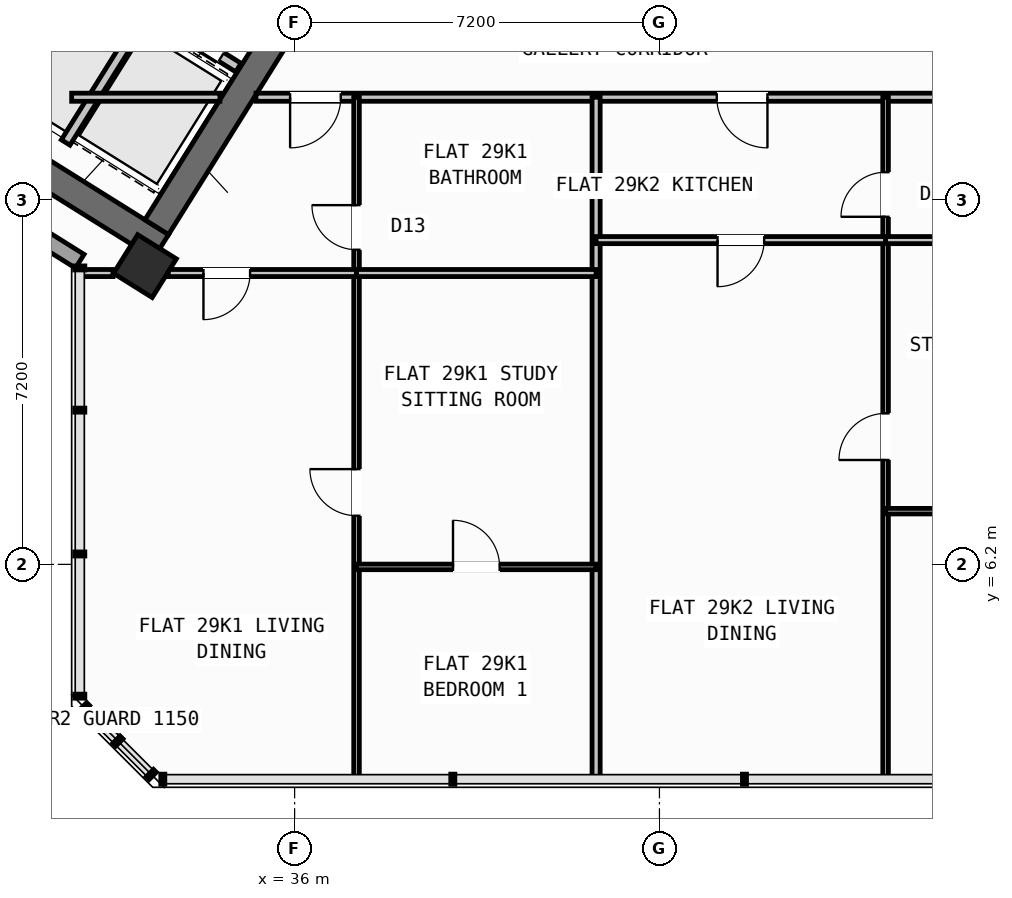
"""IFC4 building model, lengths in metres.
Left out: names, types, materials, properties, quantities, classifications, styles, units other than length and angle.
Written with IfcOpenShell. Run it as: python <this file> out.ifc"""

import sys

from ifc_helpers import new_model, si_unit, direction, frame, frame_2d, origin, origin_2d, place, context, subcontext, project, spatial, rectangle, hollow_rectangle, extrude, source, transform, mapped, element, fill, save


model = new_model("IFC4")
c1 = context("Model", 3, precision=1e-05, world=origin(), true_north=direction((0.0, 1.0)))
c2 = subcontext(c1, "Body", "Model", "MODEL_VIEW")
j1 = project(units=[si_unit("LENGTHUNIT", "METRE"), si_unit("PLANEANGLEUNIT", "RADIAN")], contexts=[c1])
p1 = place(None, origin())
s1 = spatial("IfcSite", under=j1, at=p1, CompositionType="ELEMENT")
p2 = place(p1, origin())
s2 = spatial("IfcBuilding", under=s1, at=p2, CompositionType="ELEMENT")
p3 = place(p2, frame((0.0, 0.0, 116.1)))
s3 = spatial("IfcBuildingStorey", under=s2, at=p3, CompositionType="ELEMENT", Elevation=116.1)
p4 = place(p3, frame((33.366, 12.477, 0.0), z_axis=(0.0, 0.0, 1.0), x_axis=(-0.848047359947, 0.529920442413, 0.0)))
e1 = element("IfcWall", 1, at=p4, inside=s3, PredefinedType="SHEAR", context=c2, shape_type="SweptSolid", body=[
    extrude(rectangle(XDim=13.14, YDim=0.55, at=frame_2d((6.57, 0.0))), origin(), (0.0, 0.0, 1.0), 3.35),
])
p5 = place(p3, frame((36.683, 18.304, 0.0), z_axis=(0.0, 0.0, 1.0), x_axis=(-0.529896466841, -0.848062341122, 0.0)))
e2 = element("IfcWall", 2, at=p5, inside=s3, PredefinedType="SHEAR", context=c2, shape_type="SweptSolid", body=[
    extrude(rectangle(XDim=6.425, YDim=0.55, at=frame_2d((3.212, 0.0))), origin(), (0.0, 0.0, 1.0), 3.35),
])
m1 = source(origin(), c2, "Body", "SweptSolid", [
    extrude(hollow_rectangle(XDim=0.9, YDim=0.9, WallThickness=0.036, at=origin_2d()), origin(), (0.0, 0.0, 1.0), 3.6),
])
p6 = place(p3, frame((33.046, 12.087, 0.0), z_axis=(0.0, 0.0, 1.0), x_axis=(-0.848048096156, 0.529919264233, 0.0)))
e3 = element("IfcColumn", 3, at=p6, inside=s3, PredefinedType="COLUMN", context=c2, shape_type="MappedRepresentation", body=[
    mapped(m1, transform((0.0, 0.0, 0.0), scale=1.0)),
])
p7 = place(p3, frame((31.76, 12.183, 0.0), z_axis=(0.0, 0.0, 1.0), x_axis=(-0.848047074256, 0.529920899612, 0.0)))
e4 = element("IfcWall", 4, at=p7, inside=s3, PredefinedType="STANDARD", context=c2, shape_type="SweptSolid", body=[
    extrude(rectangle(XDim=30.652, YDim=0.32, at=frame_2d((15.326, 0.0))), origin(), (0.0, 0.0, 1.0), 3.35),
])
p8 = place(p7, frame((15.153, 0.0, 0.0)))
e5 = element("IfcOpeningElement", 5, at=p8, cuts=e4, PredefinedType="OPENING", context=c2, shape_type="SweptSolid", body=[
    extrude(rectangle(XDim=1.2, YDim=2.15, at=frame_2d((0.6, 1.075))), frame((0.0, 0.17, 0.0), z_axis=(0.0, -1.0, 0.0), x_axis=(1.0, 0.0, 0.0)), (0.0, 0.0, 1.0), 0.34),
])
p9 = place(p7, frame((2.002, 0.0, 0.8)))
e6 = element("IfcOpeningElement", 6, at=p9, cuts=e4, PredefinedType="OPENING", context=c2, shape_type="SweptSolid", body=[
    extrude(rectangle(XDim=2.1, YDim=1.55, at=frame_2d((1.05, 0.775))), frame((0.0, 0.17, 0.0), z_axis=(0.0, -1.0, 0.0), x_axis=(1.0, 0.0, 0.0)), (0.0, 0.0, 1.0), 0.34),
])
p10 = place(p7, frame((7.206, 0.0, 0.8)))
e7 = element("IfcOpeningElement", 7, at=p10, cuts=e4, PredefinedType="OPENING", context=c2, shape_type="SweptSolid", body=[
    extrude(rectangle(XDim=2.1, YDim=1.55, at=frame_2d((1.05, 0.775))), frame((0.0, 0.17, 0.0), z_axis=(0.0, -1.0, 0.0), x_axis=(1.0, 0.0, 0.0)), (0.0, 0.0, 1.0), 0.34),
])
p11 = place(p7, frame((12.648, 0.0, 1.0)))
e8 = element("IfcOpeningElement", 8, at=p11, cuts=e4, PredefinedType="OPENING", context=c2, shape_type="SweptSolid", body=[
    extrude(rectangle(XDim=0.9, YDim=1.25, at=frame_2d((0.45, 0.625))), frame((0.0, 0.17, 0.0), z_axis=(0.0, -1.0, 0.0), x_axis=(1.0, 0.0, 0.0)), (0.0, 0.0, 1.0), 0.34),
])
p12 = place(p7, frame((19.458, 0.0, 0.95)))
e9 = element("IfcOpeningElement", 9, at=p12, cuts=e4, PredefinedType="OPENING", context=c2, shape_type="SweptSolid", body=[
    extrude(rectangle(XDim=1.2, YDim=1.4, at=frame_2d((0.6, 0.7))), frame((0.0, 0.17, 0.0), z_axis=(0.0, -1.0, 0.0), x_axis=(1.0, 0.0, 0.0)), (0.0, 0.0, 1.0), 0.34),
])
p13 = place(p7, frame((21.858, 0.0, 0.95)))
e10 = element("IfcOpeningElement", 10, at=p13, cuts=e4, PredefinedType="OPENING", context=c2, shape_type="SweptSolid", body=[
    extrude(rectangle(XDim=1.2, YDim=1.4, at=frame_2d((0.6, 0.7))), frame((0.0, 0.17, 0.0), z_axis=(0.0, -1.0, 0.0), x_axis=(1.0, 0.0, 0.0)), (0.0, 0.0, 1.0), 0.34),
])
p14 = place(p7, frame((27.266, 0.0, 0.8)))
e11 = element("IfcOpeningElement", 11, at=p14, cuts=e4, PredefinedType="OPENING", context=c2, shape_type="SweptSolid", body=[
    extrude(rectangle(XDim=2.1, YDim=1.55, at=frame_2d((1.05, 0.775))), frame((0.0, 0.17, 0.0), z_axis=(0.0, -1.0, 0.0), x_axis=(1.0, 0.0, 0.0)), (0.0, 0.0, 1.0), 0.34),
])
p15 = place(p3, frame((31.288, 18.256, 0.0), z_axis=(0.0, 0.0, 1.0), x_axis=(-0.529943379326, -0.848033026897, 0.0)))
e12 = element("IfcWall", 12, at=p15, inside=s3, PredefinedType="SHEAR", context=c2, shape_type="SweptSolid", body=[
    extrude(rectangle(XDim=3.16, YDim=0.26, at=frame_2d((1.58, 0.0))), origin(), (0.0, 0.0, 1.0), 3.35),
])
p16 = place(p3, frame((34.891, 16.005, 0.0), z_axis=(0.0, 0.0, 1.0), x_axis=(-0.848062873452, 0.529895614884, 0.0)))
e13 = element("IfcWall", 13, at=p16, inside=s3, PredefinedType="STANDARD", context=c2, shape_type="SweptSolid", body=[
    extrude(rectangle(XDim=4.248, YDim=0.2, at=frame_2d((2.124, 0.0))), origin(), (0.0, 0.0, 1.0), 3.34),
])
p17 = place(p16, frame((0.398, 0.0, 0.0)))
e14 = element("IfcOpeningElement", 14, at=p17, cuts=e13, PredefinedType="OPENING", context=c2, shape_type="SweptSolid", body=[
    extrude(rectangle(XDim=1.3, YDim=2.2, at=frame_2d((0.65, 1.1))), frame((0.0, 0.11, 0.0), z_axis=(0.0, -1.0, 0.0), x_axis=(1.0, 0.0, 0.0)), (0.0, 0.0, 1.0), 0.22),
])
p18 = place(p16, frame((2.473, 0.0, 0.0)))
e15 = element("IfcOpeningElement", 15, at=p18, cuts=e13, PredefinedType="OPENING", context=c2, shape_type="SweptSolid", body=[
    extrude(rectangle(XDim=1.45, YDim=2.25, at=frame_2d((0.725, 1.125))), frame((0.0, 0.11, 0.0), z_axis=(0.0, -1.0, 0.0), x_axis=(1.0, 0.0, 0.0)), (0.0, 0.0, 1.0), 0.22),
])
p19 = place(p3, frame((33.029, 17.003, 0.0), z_axis=(0.0, 0.0, 1.0), x_axis=(-0.529916267533, -0.848049968695, 0.0)))
e16 = element("IfcWall", 16, at=p19, inside=s3, PredefinedType="STANDARD", context=c2, shape_type="SweptSolid", body=[
    extrude(rectangle(XDim=2.92, YDim=0.2, at=frame_2d((1.46, 0.0))), origin(), (0.0, 0.0, 1.0), 3.34),
])
p20 = place(p3, frame((31.6, 15.42, 0.0), z_axis=(0.0, 0.0, 1.0), x_axis=(1.0, 0.0, 0.0)))
e17 = element("IfcWall", 17, at=p20, inside=s3, PredefinedType="PARTITIONING", context=c2, shape_type="SweptSolid", body=[
    extrude(rectangle(XDim=2.925, YDim=0.16, at=frame_2d((1.462, 0.0))), origin(), (0.0, 0.0, 1.0), 3.34),
])
p21 = place(p3, frame((35.237, 15.42, 0.0), z_axis=(0.0, 0.0, 1.0), x_axis=(1.0, 0.0, 0.0)))
e18 = element("IfcWall", 18, at=p21, inside=s3, PredefinedType="PARTITIONING", context=c2, shape_type="SweptSolid", body=[
    extrude(rectangle(XDim=15.432, YDim=0.16, at=frame_2d((7.716, 0.0))), origin(), (0.0, 0.0, 1.0), 3.34),
])
p22 = place(p21, frame((0.674, 0.0, 0.0)))
e19 = element("IfcOpeningElement", 19, at=p22, cuts=e18, PredefinedType="OPENING", context=c2, shape_type="SweptSolid", body=[
    extrude(rectangle(XDim=1.0, YDim=2.1, at=frame_2d((0.5, 1.05))), frame((0.0, 0.09, 0.0), z_axis=(0.0, -1.0, 0.0), x_axis=(1.0, 0.0, 0.0)), (0.0, 0.0, 1.0), 0.18),
])
p23 = place(p21, frame((9.094, 0.0, 0.0)))
e20 = element("IfcOpeningElement", 20, at=p23, cuts=e18, PredefinedType="OPENING", context=c2, shape_type="SweptSolid", body=[
    extrude(rectangle(XDim=1.0, YDim=2.1, at=frame_2d((0.5, 1.05))), frame((0.0, 0.09, 0.0), z_axis=(0.0, -1.0, 0.0), x_axis=(1.0, 0.0, 0.0)), (0.0, 0.0, 1.0), 0.18),
])
p24 = place(p3, frame((50.119, 16.333, 0.0), z_axis=(0.0, 0.0, 1.0), x_axis=(-0.587749856981, 0.809042709391, 0.0)))
e21 = element("IfcWall", 21, at=p24, inside=s3, PredefinedType="STANDARD", context=c2, shape_type="SweptSolid", body=[
    extrude(rectangle(XDim=2.96, YDim=0.2, at=frame_2d((1.48, 0.0))), origin(), (0.0, 0.0, 1.0), 3.34),
])
p25 = place(p24, frame((0.53, 0.0, 0.0)))
e22 = element("IfcOpeningElement", 22, at=p25, cuts=e21, PredefinedType="OPENING", context=c2, shape_type="SweptSolid", body=[
    extrude(rectangle(XDim=1.5, YDim=2.15, at=frame_2d((0.75, 1.075))), frame((0.0, 0.11, 0.0), z_axis=(0.0, -1.0, 0.0), x_axis=(1.0, 0.0, 0.0)), (0.0, 0.0, 1.0), 0.22),
])
p26 = place(p3, frame((41.95, 1.96, 0.0), z_axis=(0.0, 0.0, 1.0), x_axis=(0.0, 1.0, 0.0)))
e23 = element("IfcWall", 23, at=p26, inside=s3, PredefinedType="PARTITIONING", context=c2, shape_type="SweptSolid", body=[
    extrude(rectangle(XDim=13.46, YDim=0.16, at=frame_2d((6.73, 0.0))), origin(), (0.0, 0.0, 1.0), 3.34),
])
p27 = place(p3, frame((37.222, 1.96, 0.0), z_axis=(0.0, 0.0, 1.0), x_axis=(0.0, 1.0, 0.0)))
e24 = element("IfcWall", 24, at=p27, inside=s3, PredefinedType="PARTITIONING", context=c2, shape_type="SweptSolid", body=[
    extrude(rectangle(XDim=13.46, YDim=0.11, at=frame_2d((6.73, 0.0))), origin(), (0.0, 0.0, 1.0), 3.34),
])
p28 = place(p27, frame((5.2, 0.0, 0.0)))
e25 = element("IfcOpeningElement", 25, at=p28, cuts=e24, PredefinedType="OPENING", context=c2, shape_type="SweptSolid", body=[
    extrude(rectangle(XDim=0.92, YDim=2.08, at=frame_2d((0.46, 1.04))), frame((0.0, 0.065, 0.0), z_axis=(0.0, -1.0, 0.0), x_axis=(1.0, 0.0, 0.0)), (0.0, 0.0, 1.0), 0.13),
])
p29 = place(p27, frame((10.45, 0.0, 0.0)))
e26 = element("IfcOpeningElement", 26, at=p29, cuts=e24, PredefinedType="OPENING", context=c2, shape_type="SweptSolid", body=[
    extrude(rectangle(XDim=0.88, YDim=2.08, at=frame_2d((0.44, 1.04))), frame((0.0, 0.065, 0.0), z_axis=(0.0, -1.0, 0.0), x_axis=(1.0, 0.0, 0.0)), (0.0, 0.0, 1.0), 0.13),
])
p30 = place(p3, frame((31.74, 11.95, 0.0), z_axis=(0.0, 0.0, 1.0), x_axis=(1.0, 0.0, 0.0)))
e27 = element("IfcWall", 27, at=p30, inside=s3, PredefinedType="PLUMBINGWALL", context=c2, shape_type="SweptSolid", body=[
    extrude(rectangle(XDim=0.676, YDim=0.14, at=frame_2d((0.338, 0.0))), origin(), (0.0, 0.0, 1.0), 3.34),
])
p31 = place(p3, frame((33.505, 11.95, 0.0), z_axis=(0.0, 0.0, 1.0), x_axis=(1.0, 0.0, 0.0)))
e28 = element("IfcWall", 28, at=p31, inside=s3, PredefinedType="PLUMBINGWALL", context=c2, shape_type="SweptSolid", body=[
    extrude(rectangle(XDim=3.717, YDim=0.14, at=frame_2d((1.858, 0.0))), origin(), (0.0, 0.0, 1.0), 2.525),
])
p32 = place(p31, frame((0.696, 0.0, 0.0)))
e29 = element("IfcOpeningElement", 29, at=p32, cuts=e28, PredefinedType="OPENING", context=c2, shape_type="SweptSolid", body=[
    extrude(rectangle(XDim=0.92, YDim=2.08, at=frame_2d((0.46, 1.04))), frame((0.0, 0.08, 0.0), z_axis=(0.0, -1.0, 0.0), x_axis=(1.0, 0.0, 0.0)), (0.0, 0.0, 1.0), 0.16),
])
p33 = place(p3, frame((37.222, 11.95, 0.0), z_axis=(0.0, 0.0, 1.0), x_axis=(1.0, 0.0, 0.0)))
e30 = element("IfcWall", 30, at=p33, inside=s3, PredefinedType="PLUMBINGWALL", context=c2, shape_type="SweptSolid", body=[
    extrude(rectangle(XDim=4.728, YDim=0.14, at=frame_2d((2.364, 0.0))), origin(), (0.0, 0.0, 1.0), 2.525),
])
p34 = place(p3, frame((37.222, 6.15, 0.0), z_axis=(0.0, 0.0, 1.0), x_axis=(1.0, 0.0, 0.0)))
e31 = element("IfcWall", 31, at=p34, inside=s3, PredefinedType="PARTITIONING", context=c2, shape_type="SweptSolid", body=[
    extrude(rectangle(XDim=4.728, YDim=0.11, at=frame_2d((2.364, 0.0))), origin(), (0.0, 0.0, 1.0), 3.34),
])
p35 = place(p34, frame((1.904, 0.0, 0.0)))
e32 = element("IfcOpeningElement", 32, at=p35, cuts=e31, PredefinedType="OPENING", context=c2, shape_type="SweptSolid", body=[
    extrude(rectangle(XDim=0.92, YDim=2.08, at=frame_2d((0.46, 1.04))), frame((0.0, 0.065, 0.0), z_axis=(0.0, -1.0, 0.0), x_axis=(1.0, 0.0, 0.0)), (0.0, 0.0, 1.0), 0.13),
])
p36 = place(p3, frame((47.663, 1.96, 0.0), z_axis=(0.0, 0.0, 1.0), x_axis=(0.0, 1.0, 0.0)))
e33 = element("IfcWall", 33, at=p36, inside=s3, PredefinedType="PARTITIONING", context=c2, shape_type="SweptSolid", body=[
    extrude(rectangle(XDim=13.46, YDim=0.11, at=frame_2d((6.73, 0.0))), origin(), (0.0, 0.0, 1.0), 3.34),
])
p37 = place(p36, frame((6.3, 0.0, 0.0)))
e34 = element("IfcOpeningElement", 34, at=p37, cuts=e33, PredefinedType="OPENING", context=c2, shape_type="SweptSolid", body=[
    extrude(rectangle(XDim=0.92, YDim=2.08, at=frame_2d((0.46, 1.04))), frame((0.0, 0.065, 0.0), z_axis=(0.0, -1.0, 0.0), x_axis=(1.0, 0.0, 0.0)), (0.0, 0.0, 1.0), 0.13),
])
p38 = place(p36, frame((11.1, 0.0, 0.0)))
e35 = element("IfcOpeningElement", 35, at=p38, cuts=e33, PredefinedType="OPENING", context=c2, shape_type="SweptSolid", body=[
    extrude(rectangle(XDim=0.88, YDim=2.08, at=frame_2d((0.44, 1.04))), frame((0.0, 0.065, 0.0), z_axis=(0.0, -1.0, 0.0), x_axis=(1.0, 0.0, 0.0)), (0.0, 0.0, 1.0), 0.13),
])
p39 = place(p3, frame((41.95, 12.6, 0.0), z_axis=(0.0, 0.0, 1.0), x_axis=(1.0, 0.0, 0.0)))
e36 = element("IfcWall", 36, at=p39, inside=s3, PredefinedType="PLUMBINGWALL", context=c2, shape_type="SweptSolid", body=[
    extrude(rectangle(XDim=5.713, YDim=0.14, at=frame_2d((2.856, 0.0))), origin(), (0.0, 0.0, 1.0), 2.525),
])
p40 = place(p39, frame((2.396, 0.0, 0.0)))
e37 = element("IfcOpeningElement", 37, at=p40, cuts=e36, PredefinedType="OPENING", context=c2, shape_type="SweptSolid", body=[
    extrude(rectangle(XDim=0.92, YDim=2.08, at=frame_2d((0.46, 1.04))), frame((0.0, 0.08, 0.0), z_axis=(0.0, -1.0, 0.0), x_axis=(1.0, 0.0, 0.0)), (0.0, 0.0, 1.0), 0.16),
])
p41 = place(p3, frame((47.663, 12.6, 0.0), z_axis=(0.0, 0.0, 1.0), x_axis=(1.0, 0.0, 0.0)))
e38 = element("IfcWall", 38, at=p41, inside=s3, PredefinedType="PLUMBINGWALL", context=c2, shape_type="SweptSolid", body=[
    extrude(rectangle(XDim=4.597, YDim=0.14, at=frame_2d((2.298, 0.0))), origin(), (0.0, 0.0, 1.0), 2.525),
])
p42 = place(p3, frame((47.663, 7.25, 0.0), z_axis=(0.0, 0.0, 1.0), x_axis=(1.0, 0.0, 0.0)))
e39 = element("IfcWall", 39, at=p42, inside=s3, PredefinedType="PARTITIONING", context=c2, shape_type="SweptSolid", body=[
    extrude(rectangle(XDim=4.597, YDim=0.11, at=frame_2d((2.298, 0.0))), origin(), (0.0, 0.0, 1.0), 3.34),
])
p43 = place(p42, frame((1.608, 0.0, 0.0)))
e40 = element("IfcOpeningElement", 40, at=p43, cuts=e39, PredefinedType="OPENING", context=c2, shape_type="SweptSolid", body=[
    extrude(rectangle(XDim=0.92, YDim=2.08, at=frame_2d((0.46, 1.04))), frame((0.0, 0.065, 0.0), z_axis=(0.0, -1.0, 0.0), x_axis=(1.0, 0.0, 0.0)), (0.0, 0.0, 1.0), 0.13),
])
m2 = source(origin(), c2, "Body", "SweptSolid", [
    extrude(rectangle(XDim=1.3, YDim=2.2, at=frame_2d((0.65, 1.1))), frame((0.0, 0.025, 0.0), z_axis=(0.0, -1.0, 0.0), x_axis=(1.0, 0.0, 0.0)), (0.0, 0.0, 1.0), 0.05),
])
p44 = place(p17, origin())
e41 = element("IfcDoor", 41, at=p44, inside=s3, OperationType="DOUBLE_DOOR_SLIDING", PredefinedType="DOOR", context=c2, shape_type="MappedRepresentation", body=[
    mapped(m2, transform((0.0, 0.0, 0.0), scale=1.0)),
])
fill(e14, e41)
m3 = source(origin(), c2, "Body", "SweptSolid", [
    extrude(rectangle(XDim=0.92, YDim=2.08, at=frame_2d((0.46, 1.04))), frame((0.0, 0.025, 0.0), z_axis=(0.0, -1.0, 0.0), x_axis=(1.0, 0.0, 0.0)), (0.0, 0.0, 1.0), 0.05),
])
p45 = place(p28, origin())
e42 = element("IfcDoor", 42, at=p45, inside=s3, OperationType="SINGLE_SWING_RIGHT", PredefinedType="DOOR", context=c2, shape_type="MappedRepresentation", body=[
    mapped(m3, transform((0.0, 0.0, 0.0), scale=1.0)),
])
fill(e25, e42)
p46 = place(p35, origin())
e43 = element("IfcDoor", 43, at=p46, inside=s3, OperationType="SINGLE_SWING_LEFT", PredefinedType="DOOR", context=c2, shape_type="MappedRepresentation", body=[
    mapped(m3, transform((0.0, 0.0, 0.0), scale=1.0)),
])
fill(e32, e43)
m4 = source(origin(), c2, "Body", "SweptSolid", [
    extrude(rectangle(XDim=1.0, YDim=2.1, at=frame_2d((0.5, 1.05))), frame((0.0, 0.025, 0.0), z_axis=(0.0, -1.0, 0.0), x_axis=(1.0, 0.0, 0.0)), (0.0, 0.0, 1.0), 0.05),
])
p47 = place(p22, frame((1.0, 0.0, 0.0), z_axis=(0.0, 0.0, 1.0), x_axis=(-1.0, 0.0, 0.0)))
e44 = element("IfcDoor", 44, at=p47, inside=s3, OperationType="SINGLE_SWING_RIGHT", PredefinedType="DOOR", context=c2, shape_type="MappedRepresentation", body=[
    mapped(m4, transform((0.0, 0.0, 0.0), scale=1.0)),
])
fill(e19, e44)
p48 = place(p32, frame((0.92, 0.0, 0.0), z_axis=(0.0, 0.0, 1.0), x_axis=(-1.0, 0.0, 0.0)))
e45 = element("IfcDoor", 45, at=p48, inside=s3, OperationType="SINGLE_SWING_RIGHT", PredefinedType="DOOR", context=c2, shape_type="MappedRepresentation", body=[
    mapped(m3, transform((0.0, 0.0, 0.0), scale=1.0)),
])
fill(e29, e45)
m5 = source(origin(), c2, "Body", "SweptSolid", [
    extrude(rectangle(XDim=0.88, YDim=2.08, at=frame_2d((0.44, 1.04))), frame((0.0, 0.025, 0.0), z_axis=(0.0, -1.0, 0.0), x_axis=(1.0, 0.0, 0.0)), (0.0, 0.0, 1.0), 0.05),
])
p49 = place(p29, origin())
e46 = element("IfcDoor", 46, at=p49, inside=s3, OperationType="SINGLE_SWING_RIGHT", PredefinedType="DOOR", context=c2, shape_type="MappedRepresentation", body=[
    mapped(m5, transform((0.0, 0.0, 0.0), scale=1.0)),
])
fill(e26, e46)
p50 = place(p37, origin())
e47 = element("IfcDoor", 47, at=p50, inside=s3, OperationType="SINGLE_SWING_LEFT", PredefinedType="DOOR", context=c2, shape_type="MappedRepresentation", body=[
    mapped(m3, transform((0.0, 0.0, 0.0), scale=1.0)),
])
fill(e34, e47)
p51 = place(p23, frame((1.0, 0.0, 0.0), z_axis=(0.0, 0.0, 1.0), x_axis=(-1.0, 0.0, 0.0)))
e48 = element("IfcDoor", 48, at=p51, inside=s3, OperationType="SINGLE_SWING_LEFT", PredefinedType="DOOR", context=c2, shape_type="MappedRepresentation", body=[
    mapped(m4, transform((0.0, 0.0, 0.0), scale=1.0)),
])
fill(e20, e48)
p52 = place(p40, frame((0.92, 0.0, 0.0), z_axis=(0.0, 0.0, 1.0), x_axis=(-1.0, 0.0, 0.0)))
e49 = element("IfcDoor", 49, at=p52, inside=s3, OperationType="SINGLE_SWING_RIGHT", PredefinedType="DOOR", context=c2, shape_type="MappedRepresentation", body=[
    mapped(m3, transform((0.0, 0.0, 0.0), scale=1.0)),
])
fill(e37, e49)
p53 = place(p38, origin())
e50 = element("IfcDoor", 50, at=p53, inside=s3, OperationType="SINGLE_SWING_LEFT", PredefinedType="DOOR", context=c2, shape_type="MappedRepresentation", body=[
    mapped(m5, transform((0.0, 0.0, 0.0), scale=1.0)),
])
fill(e35, e50)
save(model, sys.argv[1])
